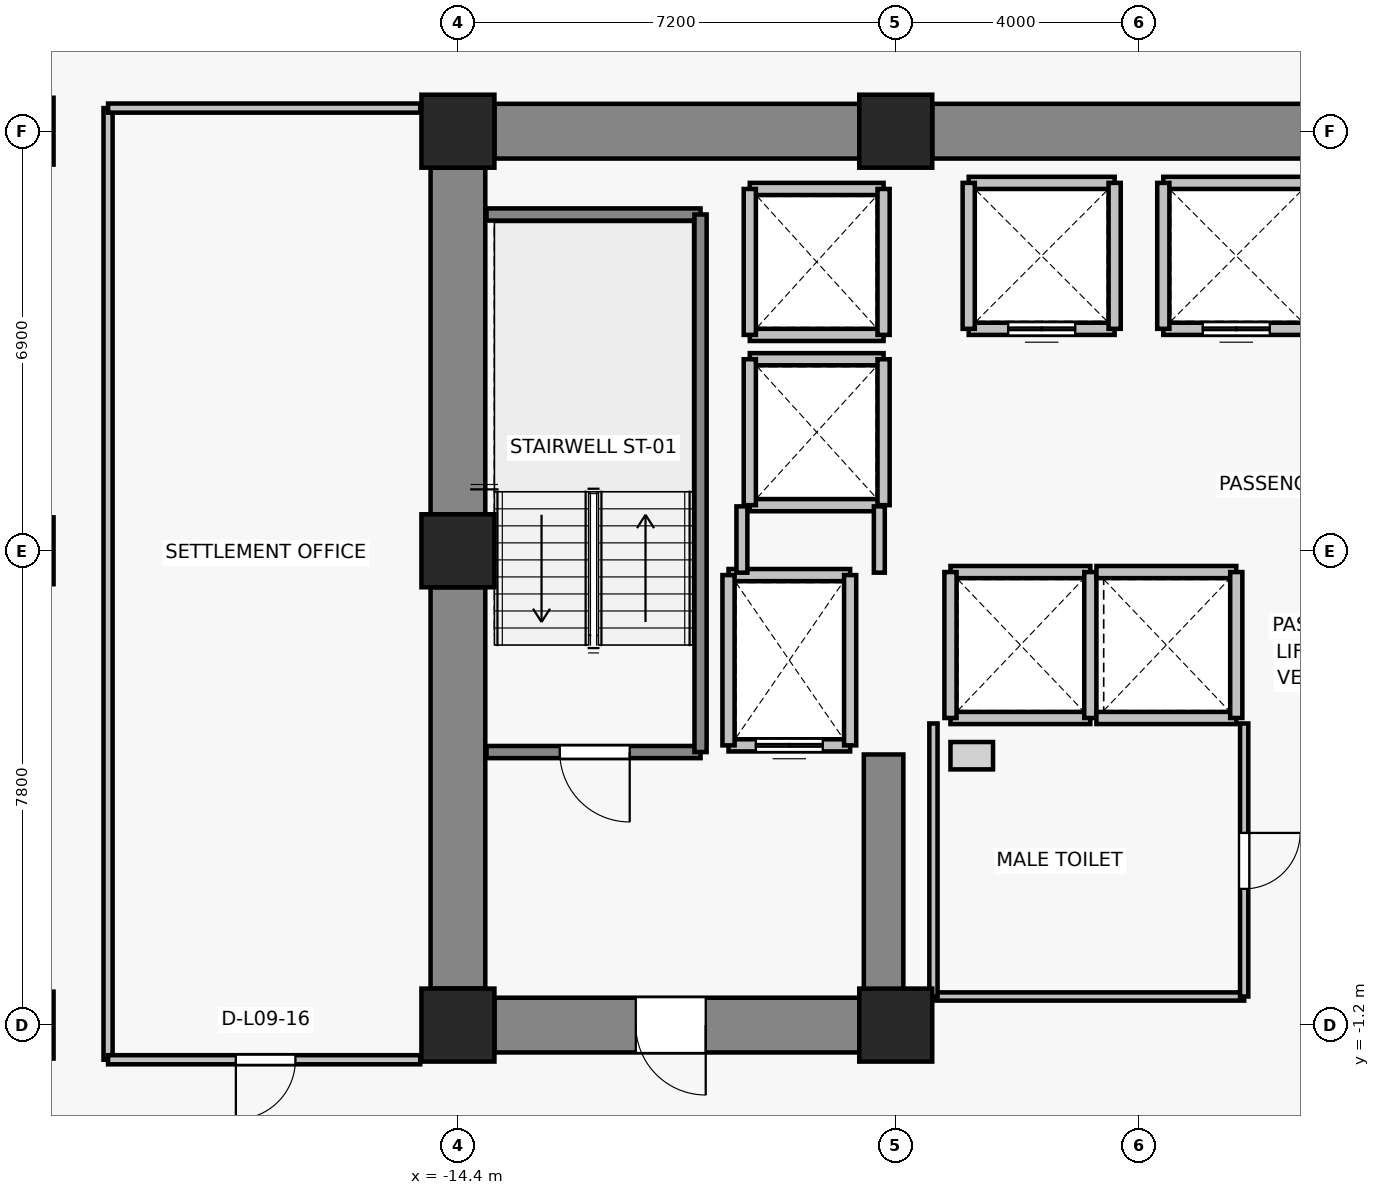
"""IFC4 building model, lengths in metres.
Left out: names, types, materials, properties, quantities, classifications, styles, units other than length and angle.
Written with IfcOpenShell. Run it as: python <this file> out.ifc"""

import sys

from ifc_helpers import new_model, si_unit, direction, frame, frame_2d, origin, origin_2d, place, context, subcontext, project, spatial, rectangle, extrude, source, transform, mapped, element, fill, save


model = new_model("IFC4")
c1 = context("Model", 3, precision=1e-05, world=origin(), true_north=direction((0.0, 1.0)))
c2 = subcontext(c1, "Body", "Model", "MODEL_VIEW")
j1 = project(units=[si_unit("LENGTHUNIT", "METRE"), si_unit("PLANEANGLEUNIT", "RADIAN")], contexts=[c1])
p1 = place(None, origin())
s1 = spatial("IfcSite", under=j1, at=p1, CompositionType="ELEMENT")
p2 = place(p1, origin())
s2 = spatial("IfcBuilding", under=s1, at=p2, CompositionType="ELEMENT")
p3 = place(p2, frame((0.0, 0.0, 37.3)))
s3 = spatial("IfcBuildingStorey", under=s2, at=p3, CompositionType="ELEMENT", Elevation=37.3)
for number, where, z_axis, x_axis in (
    (1, (-14.4, -1.2, 0.0), (0.0, 0.0, 1.0), (1.0, 0.0, 0.0)),
    (2, (-7.2, -1.2, 0.0), (0.0, 0.0, 1.0), (1.0, 0.0, 0.0)),
    (3, (-14.4, 6.6, 0.0), (0.0, 0.0, 1.0), (1.0, 0.0, 0.0)),
    (4, (-14.4, 13.5, 0.0), (0.0, 0.0, 1.0), (1.0, 0.0, 0.0)),
    (5, (-7.2, 13.5, 0.0), (0.0, 0.0, 1.0), (1.0, 0.0, 0.0)),
):
    element("IfcColumn", number, at=place(p3, frame(where, z_axis=z_axis, x_axis=x_axis)), inside=s3, PredefinedType="COLUMN", context=c2, shape_type="SweptSolid", body=[
        extrude(rectangle(XDim=1.2, YDim=1.2, at=origin_2d()), origin(), (0.0, 0.0, 1.0), 3.3),
    ])
for number, where, z_axis, x_axis in (
    (6, (-21.6, -1.2, 0.0), (0.0, 0.0, 1.0), (1.0, 0.0, 0.0)),
    (7, (-21.6, 6.6, 0.0), (0.0, 0.0, 1.0), (1.0, 0.0, 0.0)),
    (8, (-21.6, 13.5, 0.0), (0.0, 0.0, 1.0), (1.0, 0.0, 0.0)),
):
    element("IfcColumn", number, at=place(p3, frame(where, z_axis=z_axis, x_axis=x_axis)), inside=s3, PredefinedType="COLUMN", context=c2, shape_type="SweptSolid", body=[
        extrude(rectangle(XDim=1.1, YDim=1.1, at=origin_2d()), origin(), (0.0, 0.0, 1.0), 3.3),
    ])
p4 = place(p3, frame((-13.8, 13.5, 0.0), z_axis=(0.0, 0.0, 1.0), x_axis=(1.0, 0.0, 0.0)))
e9 = element("IfcWall", 9, at=p4, inside=s3, PredefinedType="SHEAR", context=c2, shape_type="SweptSolid", body=[
    extrude(rectangle(XDim=6.0, YDim=0.9, at=frame_2d((3.0, 0.0))), origin(), (0.0, 0.0, 1.0), 3.075),
])
p5 = place(p3, frame((-6.6, 13.5, 0.0), z_axis=(0.0, 0.0, 1.0), x_axis=(1.0, 0.0, 0.0)))
e10 = element("IfcWall", 10, at=p5, inside=s3, PredefinedType="SHEAR", context=c2, shape_type="SweptSolid", body=[
    extrude(rectangle(XDim=13.2, YDim=0.9, at=frame_2d((6.6, 0.0))), origin(), (0.0, 0.0, 1.0), 3.075),
])
p6 = place(p3, frame((-14.4, -0.6, 0.0), z_axis=(0.0, 0.0, 1.0), x_axis=(0.0, 1.0, 0.0)))
e11 = element("IfcWall", 11, at=p6, inside=s3, PredefinedType="SHEAR", context=c2, shape_type="SweptSolid", body=[
    extrude(rectangle(XDim=6.6, YDim=0.9, at=frame_2d((3.3, 0.0))), origin(), (0.0, 0.0, 1.0), 3.075),
])
p7 = place(p3, frame((-14.4, 7.2, 0.0), z_axis=(0.0, 0.0, 1.0), x_axis=(0.0, 1.0, 0.0)))
e12 = element("IfcWall", 12, at=p7, inside=s3, PredefinedType="SHEAR", context=c2, shape_type="SweptSolid", body=[
    extrude(rectangle(XDim=5.7, YDim=0.9, at=frame_2d((2.85, 0.0))), origin(), (0.0, 0.0, 1.0), 3.075),
])
p8 = place(p3, frame((-7.8, -1.2, 0.0), z_axis=(0.0, 0.0, 1.0), x_axis=(-1.0, 0.0, 0.0)))
e13 = element("IfcWall", 13, at=p8, inside=s3, PredefinedType="SHEAR", context=c2, shape_type="SweptSolid", body=[
    extrude(rectangle(XDim=6.0, YDim=0.9, at=frame_2d((3.0, 0.0))), origin(), (0.0, 0.0, 1.0), 3.075),
])
p9 = place(p8, frame((2.525, 0.0, 0.0)))
e14 = element("IfcOpeningElement", 14, at=p9, cuts=e13, PredefinedType="OPENING", context=c2, shape_type="SweptSolid", body=[
    extrude(rectangle(XDim=1.15, YDim=2.15, at=frame_2d((0.575, 1.075))), frame((0.0, 0.46, 0.0), z_axis=(0.0, -1.0, 0.0), x_axis=(1.0, 0.0, 0.0)), (0.0, 0.0, 1.0), 0.92),
])
p10 = place(p3, frame((-7.4, -0.75, 0.0), z_axis=(0.0, 0.0, 1.0), x_axis=(0.0, 1.0, 0.0)))
e15 = element("IfcWall", 15, at=p10, inside=s3, PredefinedType="SHEAR", context=c2, shape_type="SweptSolid", body=[
    extrude(rectangle(XDim=4.0, YDim=0.65, at=frame_2d((2.0, 0.0))), origin(), (0.0, 0.0, 1.0), 3.075),
])
p11 = place(p3, frame((-7.95, 3.4, 0.0), z_axis=(0.0, 0.0, 1.0), x_axis=(-1.0, 0.0, 0.0)))
e16 = element("IfcWall", 16, at=p11, inside=s3, PredefinedType="SOLIDWALL", context=c2, shape_type="SweptSolid", body=[
    extrude(rectangle(XDim=2.0, YDim=0.2, at=frame_2d((1.0, 0.0))), origin(), (0.0, 0.0, 1.0), 3.075),
])
p12 = place(p11, frame((0.45, 0.0, 0.0)))
e17 = element("IfcOpeningElement", 17, at=p12, cuts=e16, PredefinedType="OPENING", context=c2, shape_type="SweptSolid", body=[
    extrude(rectangle(XDim=1.1, YDim=2.2, at=frame_2d((0.55, 1.1))), frame((0.0, 0.11, 0.0), z_axis=(0.0, -1.0, 0.0), x_axis=(1.0, 0.0, 0.0)), (0.0, 0.0, 1.0), 0.22),
])
p13 = place(p3, frame((-9.95, 6.2, 0.0), z_axis=(0.0, 0.0, 1.0), x_axis=(1.0, 0.0, 0.0)))
e18 = element("IfcWall", 18, at=p13, inside=s3, PredefinedType="SOLIDWALL", context=c2, shape_type="SweptSolid", body=[
    extrude(rectangle(XDim=2.0, YDim=0.2, at=frame_2d((1.0, 0.0))), origin(), (0.0, 0.0, 1.0), 3.075),
])
for number, where, z_axis, x_axis in (
    (19, (-9.95, 3.4, 0.0), (0.0, 0.0, 1.0), (0.0, 1.0, 0.0)),
    (20, (-7.95, 6.2, 0.0), (0.0, 0.0, 1.0), (0.0, -1.0, 0.0)),
):
    element("IfcWall", number, at=place(p3, frame(where, z_axis=z_axis, x_axis=x_axis)), inside=s3, PredefinedType="SOLIDWALL", context=c2, shape_type="SweptSolid", body=[
        extrude(rectangle(XDim=2.8, YDim=0.2, at=frame_2d((1.4, 0.0))), origin(), (0.0, 0.0, 1.0), 3.075),
    ])
p14 = place(p3, frame((-3.6, 10.25, 0.0), z_axis=(0.0, 0.0, 1.0), x_axis=(-1.0, 0.0, 0.0)))
e21 = element("IfcWall", 21, at=p14, inside=s3, PredefinedType="SOLIDWALL", context=c2, shape_type="SweptSolid", body=[
    extrude(rectangle(XDim=2.4, YDim=0.2, at=frame_2d((1.2, 0.0))), origin(), (0.0, 0.0, 1.0), 3.075),
])
p15 = place(p14, frame((0.65, 0.0, 0.0)))
e22 = element("IfcOpeningElement", 22, at=p15, cuts=e21, PredefinedType="OPENING", context=c2, shape_type="SweptSolid", body=[
    extrude(rectangle(XDim=1.1, YDim=2.2, at=frame_2d((0.55, 1.1))), frame((0.0, 0.11, 0.0), z_axis=(0.0, -1.0, 0.0), x_axis=(1.0, 0.0, 0.0)), (0.0, 0.0, 1.0), 0.22),
])
for number, where, z_axis, x_axis in (
    (23, (-6.0, 12.65, 0.0), (0.0, 0.0, 1.0), (1.0, 0.0, 0.0)),
    (24, (-6.0, 10.25, 0.0), (0.0, 0.0, 1.0), (0.0, 1.0, 0.0)),
    (25, (-3.6, 12.65, 0.0), (0.0, 0.0, 1.0), (0.0, -1.0, 0.0)),
):
    element("IfcWall", number, at=place(p3, frame(where, z_axis=z_axis, x_axis=x_axis)), inside=s3, PredefinedType="SOLIDWALL", context=c2, shape_type="SweptSolid", body=[
        extrude(rectangle(XDim=2.4, YDim=0.2, at=frame_2d((1.2, 0.0))), origin(), (0.0, 0.0, 1.0), 3.075),
    ])
p16 = place(p3, frame((-0.4, 10.25, 0.0), z_axis=(0.0, 0.0, 1.0), x_axis=(-1.0, 0.0, 0.0)))
e26 = element("IfcWall", 26, at=p16, inside=s3, PredefinedType="SOLIDWALL", context=c2, shape_type="SweptSolid", body=[
    extrude(rectangle(XDim=2.4, YDim=0.2, at=frame_2d((1.2, 0.0))), origin(), (0.0, 0.0, 1.0), 3.075),
])
p17 = place(p16, frame((0.65, 0.0, 0.0)))
e27 = element("IfcOpeningElement", 27, at=p17, cuts=e26, PredefinedType="OPENING", context=c2, shape_type="SweptSolid", body=[
    extrude(rectangle(XDim=1.1, YDim=2.2, at=frame_2d((0.55, 1.1))), frame((0.0, 0.11, 0.0), z_axis=(0.0, -1.0, 0.0), x_axis=(1.0, 0.0, 0.0)), (0.0, 0.0, 1.0), 0.22),
])
p18 = place(p3, frame((-2.8, 12.65, 0.0), z_axis=(0.0, 0.0, 1.0), x_axis=(1.0, 0.0, 0.0)))
e28 = element("IfcWall", 28, at=p18, inside=s3, PredefinedType="SOLIDWALL", context=c2, shape_type="SweptSolid", body=[
    extrude(rectangle(XDim=2.4, YDim=0.2, at=frame_2d((1.2, 0.0))), origin(), (0.0, 0.0, 1.0), 3.075),
])
p19 = place(p3, frame((-2.8, 10.25, 0.0), z_axis=(0.0, 0.0, 1.0), x_axis=(0.0, 1.0, 0.0)))
e29 = element("IfcWall", 29, at=p19, inside=s3, PredefinedType="SOLIDWALL", context=c2, shape_type="SweptSolid", body=[
    extrude(rectangle(XDim=2.4, YDim=0.2, at=frame_2d((1.2, 0.0))), origin(), (0.0, 0.0, 1.0), 3.075),
])
for number, where, z_axis, x_axis in (
    (30, (-4.0, 3.85, 0.0), (0.0, 0.0, 1.0), (-1.0, 0.0, 0.0)),
    (31, (-6.3, 6.25, 0.0), (0.0, 0.0, 1.0), (1.0, 0.0, 0.0)),
):
    element("IfcWall", number, at=place(p3, frame(where, z_axis=z_axis, x_axis=x_axis)), inside=s3, PredefinedType="SOLIDWALL", context=c2, shape_type="SweptSolid", body=[
        extrude(rectangle(XDim=2.3, YDim=0.2, at=frame_2d((1.15, 0.0))), origin(), (0.0, 0.0, 1.0), 3.075),
    ])
for number, where, z_axis, x_axis in (
    (32, (-6.3, 3.85, 0.0), (0.0, 0.0, 1.0), (0.0, 1.0, 0.0)),
    (33, (-4.0, 6.25, 0.0), (0.0, 0.0, 1.0), (0.0, -1.0, 0.0)),
):
    element("IfcWall", number, at=place(p3, frame(where, z_axis=z_axis, x_axis=x_axis)), inside=s3, PredefinedType="SOLIDWALL", context=c2, shape_type="SweptSolid", body=[
        extrude(rectangle(XDim=2.4, YDim=0.2, at=frame_2d((1.2, 0.0))), origin(), (0.0, 0.0, 1.0), 3.075),
    ])
for number, where, z_axis, x_axis in (
    (34, (-1.6, 3.85, 0.0), (0.0, 0.0, 1.0), (-1.0, 0.0, 0.0)),
    (35, (-3.9, 6.25, 0.0), (0.0, 0.0, 1.0), (1.0, 0.0, 0.0)),
):
    element("IfcWall", number, at=place(p3, frame(where, z_axis=z_axis, x_axis=x_axis)), inside=s3, PredefinedType="SOLIDWALL", context=c2, shape_type="SweptSolid", body=[
        extrude(rectangle(XDim=2.3, YDim=0.2, at=frame_2d((1.15, 0.0))), origin(), (0.0, 0.0, 1.0), 3.075),
    ])
p20 = place(p3, frame((-1.6, 6.25, 0.0), z_axis=(0.0, 0.0, 1.0), x_axis=(0.0, -1.0, 0.0)))
e36 = element("IfcWall", 36, at=p20, inside=s3, PredefinedType="SOLIDWALL", context=c2, shape_type="SweptSolid", body=[
    extrude(rectangle(XDim=2.4, YDim=0.2, at=frame_2d((1.2, 0.0))), origin(), (0.0, 0.0, 1.0), 3.075),
])
for number, where, z_axis, x_axis in (
    (37, (-7.4, 7.35, 0.0), (0.0, 0.0, 1.0), (-1.0, 0.0, 0.0)),
    (38, (-9.6, 9.75, 0.0), (0.0, 0.0, 1.0), (1.0, 0.0, 0.0)),
):
    element("IfcWall", number, at=place(p3, frame(where, z_axis=z_axis, x_axis=x_axis)), inside=s3, PredefinedType="SOLIDWALL", context=c2, shape_type="SweptSolid", body=[
        extrude(rectangle(XDim=2.2, YDim=0.2, at=frame_2d((1.1, 0.0))), origin(), (0.0, 0.0, 1.0), 2.465),
    ])
p21 = place(p3, frame((-9.6, 7.35, 0.0), z_axis=(0.0, 0.0, 1.0), x_axis=(0.0, 1.0, 0.0)))
e39 = element("IfcWall", 39, at=p21, inside=s3, PredefinedType="SOLIDWALL", context=c2, shape_type="SweptSolid", body=[
    extrude(rectangle(XDim=2.4, YDim=0.2, at=frame_2d((1.2, 0.0))), origin(), (0.0, 0.0, 1.0), 3.075),
])
p22 = place(p3, frame((-7.4, 9.75, 0.0), z_axis=(0.0, 0.0, 1.0), x_axis=(0.0, -1.0, 0.0)))
e40 = element("IfcWall", 40, at=p22, inside=s3, PredefinedType="SOLIDWALL", context=c2, shape_type="SweptSolid", body=[
    extrude(rectangle(XDim=2.4, YDim=0.2, at=frame_2d((1.2, 0.0))), origin(), (0.0, 0.0, 1.0), 2.465),
])
for number, where, z_axis, x_axis in (
    (41, (-7.4, 10.15, 0.0), (0.0, 0.0, 1.0), (-1.0, 0.0, 0.0)),
    (42, (-9.6, 12.55, 0.0), (0.0, 0.0, 1.0), (1.0, 0.0, 0.0)),
):
    element("IfcWall", number, at=place(p3, frame(where, z_axis=z_axis, x_axis=x_axis)), inside=s3, PredefinedType="SOLIDWALL", context=c2, shape_type="SweptSolid", body=[
        extrude(rectangle(XDim=2.2, YDim=0.2, at=frame_2d((1.1, 0.0))), origin(), (0.0, 0.0, 1.0), 2.465),
    ])
p23 = place(p3, frame((-9.6, 10.15, 0.0), z_axis=(0.0, 0.0, 1.0), x_axis=(0.0, 1.0, 0.0)))
e43 = element("IfcWall", 43, at=p23, inside=s3, PredefinedType="SOLIDWALL", context=c2, shape_type="SweptSolid", body=[
    extrude(rectangle(XDim=2.4, YDim=0.2, at=frame_2d((1.2, 0.0))), origin(), (0.0, 0.0, 1.0), 3.075),
])
p24 = place(p3, frame((-7.4, 12.55, 0.0), z_axis=(0.0, 0.0, 1.0), x_axis=(0.0, -1.0, 0.0)))
e44 = element("IfcWall", 44, at=p24, inside=s3, PredefinedType="SOLIDWALL", context=c2, shape_type="SweptSolid", body=[
    extrude(rectangle(XDim=2.4, YDim=0.2, at=frame_2d((1.2, 0.0))), origin(), (0.0, 0.0, 1.0), 2.465),
])
p25 = place(p3, frame((-10.41, 3.29, 0.0), z_axis=(0.0, 0.0, 1.0), x_axis=(-1.0, 0.0, 0.0)))
e45 = element("IfcWall", 45, at=p25, inside=s3, PredefinedType="SOLIDWALL", context=c2, shape_type="SweptSolid", body=[
    extrude(rectangle(XDim=3.52, YDim=0.2, at=frame_2d((1.76, 0.0))), origin(), (0.0, 0.0, 1.0), 3.075),
])
p26 = place(p25, frame((1.165, 0.0, 0.0)))
e46 = element("IfcOpeningElement", 46, at=p26, cuts=e45, PredefinedType="OPENING", context=c2, shape_type="SweptSolid", body=[
    extrude(rectangle(XDim=1.15, YDim=2.15, at=frame_2d((0.575, 1.075))), frame((0.0, 0.11, 0.0), z_axis=(0.0, -1.0, 0.0), x_axis=(1.0, 0.0, 0.0)), (0.0, 0.0, 1.0), 0.22),
])
p27 = place(p3, frame((-13.93, 12.13, 0.0), z_axis=(0.0, 0.0, 1.0), x_axis=(1.0, 0.0, 0.0)))
e47 = element("IfcWall", 47, at=p27, inside=s3, PredefinedType="SOLIDWALL", context=c2, shape_type="SweptSolid", body=[
    extrude(rectangle(XDim=3.52, YDim=0.2, at=frame_2d((1.76, 0.0))), origin(), (0.0, 0.0, 1.0), 3.075),
])
p28 = place(p3, frame((-10.41, 12.13, 0.0), z_axis=(0.0, 0.0, 1.0), x_axis=(0.0, -1.0, 0.0)))
e48 = element("IfcWall", 48, at=p28, inside=s3, PredefinedType="SOLIDWALL", context=c2, shape_type="SweptSolid", body=[
    extrude(rectangle(XDim=8.84, YDim=0.2, at=frame_2d((4.42, 0.0))), origin(), (0.0, 0.0, 1.0), 3.075),
])
p29 = place(p3, frame((-9.73, 6.24, 0.0), z_axis=(0.0, 0.0, 1.0), x_axis=(0.0, 1.0, 0.0)))
e49 = element("IfcWall", 49, at=p29, inside=s3, PredefinedType="PARTITIONING", context=c2, shape_type="SweptSolid", body=[
    extrude(rectangle(XDim=1.09, YDim=0.18, at=frame_2d((0.545, 0.0))), origin(), (0.0, 0.0, 1.0), 3.075),
])
p30 = place(p3, frame((-7.47, 7.33, 0.0), z_axis=(0.0, 0.0, 1.0), x_axis=(0.0, -1.0, 0.0)))
e50 = element("IfcWall", 50, at=p30, inside=s3, PredefinedType="PARTITIONING", context=c2, shape_type="SweptSolid", body=[
    extrude(rectangle(XDim=1.09, YDim=0.18, at=frame_2d((0.545, 0.0))), origin(), (0.0, 0.0, 1.0), 2.465),
])
p31 = place(p3, frame((-1.47, -0.73, 0.0), z_axis=(0.0, 0.0, 1.0), x_axis=(-1.0, 0.0, 0.0)))
e51 = element("IfcWall", 51, at=p31, inside=s3, PredefinedType="PARTITIONING", context=c2, shape_type="SweptSolid", body=[
    extrude(rectangle(XDim=5.11, YDim=0.135, at=frame_2d((2.555, 0.0))), origin(), (0.0, 0.0, 1.0), 3.075),
])
p32 = place(p3, frame((-6.58, -0.73, 0.0), z_axis=(0.0, 0.0, 1.0), x_axis=(0.0, 1.0, 0.0)))
e52 = element("IfcWall", 52, at=p32, inside=s3, PredefinedType="PARTITIONING", context=c2, shape_type="SweptSolid", body=[
    extrude(rectangle(XDim=4.49, YDim=0.135, at=frame_2d((2.245, 0.0))), origin(), (0.0, 0.0, 1.0), 3.075),
])
p33 = place(p3, frame((-1.47, 3.76, 0.0), z_axis=(0.0, 0.0, 1.0), x_axis=(0.0, -1.0, 0.0)))
e53 = element("IfcWall", 53, at=p33, inside=s3, PredefinedType="PARTITIONING", context=c2, shape_type="SweptSolid", body=[
    extrude(rectangle(XDim=4.49, YDim=0.135, at=frame_2d((2.245, 0.0))), origin(), (0.0, 0.0, 1.0), 3.075),
])
p34 = place(p33, frame((1.8, 0.0, 0.0)))
e54 = element("IfcOpeningElement", 54, at=p34, cuts=e53, PredefinedType="OPENING", context=c2, shape_type="SweptSolid", body=[
    extrude(rectangle(XDim=0.92, YDim=2.1, at=frame_2d((0.46, 1.05))), frame((0.0, 0.077, 0.0), z_axis=(0.0, -1.0, 0.0), x_axis=(1.0, 0.0, 0.0)), (0.0, 0.0, 1.0), 0.155),
])
p35 = place(p3, frame((-20.154, 13.88, 0.0), z_axis=(0.0, 0.0, 1.0), x_axis=(0.0, -1.0, 0.0)))
e55 = element("IfcWall", 55, at=p35, inside=s3, PredefinedType="PARTITIONING", context=c2, shape_type="SweptSolid", body=[
    extrude(rectangle(XDim=15.65, YDim=0.15, at=frame_2d((7.825, 0.0))), origin(), (0.0, 0.0, 1.0), 2.465),
])
p36 = place(p3, frame((-15.02, -1.77, 0.0), z_axis=(0.0, 0.0, 1.0), x_axis=(-1.0, 0.0, 0.0)))
e56 = element("IfcWall", 56, at=p36, inside=s3, PredefinedType="PARTITIONING", context=c2, shape_type="SweptSolid", body=[
    extrude(rectangle(XDim=5.134, YDim=0.15, at=frame_2d((2.567, 0.0))), origin(), (0.0, 0.0, 1.0), 3.075),
])
p37 = place(p36, frame((2.052, 0.0, 0.0)))
e57 = element("IfcOpeningElement", 57, at=p37, cuts=e56, PredefinedType="OPENING", context=c2, shape_type="SweptSolid", body=[
    extrude(rectangle(XDim=0.98, YDim=2.15, at=frame_2d((0.49, 1.075))), frame((0.0, 0.085, 0.0), z_axis=(0.0, -1.0, 0.0), x_axis=(1.0, 0.0, 0.0)), (0.0, 0.0, 1.0), 0.17),
])
p38 = place(p3, frame((-20.154, 13.88, 0.0), z_axis=(0.0, 0.0, 1.0), x_axis=(1.0, 0.0, 0.0)))
e58 = element("IfcWall", 58, at=p38, inside=s3, PredefinedType="PARTITIONING", context=c2, shape_type="SweptSolid", body=[
    extrude(rectangle(XDim=5.134, YDim=0.15, at=frame_2d((2.567, 0.0))), origin(), (0.0, 0.0, 1.0), 3.075),
])
m1 = source(origin(), c2, "Body", "SweptSolid", [
    extrude(rectangle(XDim=1.1, YDim=2.2, at=frame_2d((0.55, 1.1))), frame((0.0, 0.025, 0.0), z_axis=(0.0, -1.0, 0.0), x_axis=(1.0, 0.0, 0.0)), (0.0, 0.0, 1.0), 0.05),
])
p39 = place(p12, origin())
e59 = element("IfcDoor", 59, at=p39, inside=s3, OperationType="DOUBLE_DOOR_SLIDING", PredefinedType="DOOR", context=c2, shape_type="MappedRepresentation", body=[
    mapped(m1, transform((0.0, 0.0, 0.0), x_axis=(1.0, 0.0, 0.0), y_axis=(0.0, 1.0, 0.0), z_axis=(0.0, 0.0, 1.0), scale=1.0)),
])
fill(e17, e59)
p40 = place(p15, origin())
e60 = element("IfcDoor", 60, at=p40, inside=s3, OperationType="DOUBLE_DOOR_SLIDING", PredefinedType="DOOR", context=c2, shape_type="MappedRepresentation", body=[
    mapped(m1, transform((0.0, 0.0, 0.0), x_axis=(1.0, 0.0, 0.0), y_axis=(0.0, 1.0, 0.0), z_axis=(0.0, 0.0, 1.0), scale=1.0)),
])
fill(e22, e60)
p41 = place(p17, origin())
e61 = element("IfcDoor", 61, at=p41, inside=s3, OperationType="DOUBLE_DOOR_SLIDING", PredefinedType="DOOR", context=c2, shape_type="MappedRepresentation", body=[
    mapped(m1, transform((0.0, 0.0, 0.0), x_axis=(1.0, 0.0, 0.0), y_axis=(0.0, 1.0, 0.0), z_axis=(0.0, 0.0, 1.0), scale=1.0)),
])
fill(e27, e61)
m2 = source(origin(), c2, "Body", "SweptSolid", [
    extrude(rectangle(XDim=1.15, YDim=2.15, at=frame_2d((0.575, 1.075))), frame((0.0, 0.025, 0.0), z_axis=(0.0, -1.0, 0.0), x_axis=(1.0, 0.0, 0.0)), (0.0, 0.0, 1.0), 0.05),
])
p42 = place(p26, origin())
e62 = element("IfcDoor", 62, at=p42, inside=s3, OperationType="SINGLE_SWING_LEFT", PredefinedType="DOOR", context=c2, shape_type="MappedRepresentation", body=[
    mapped(m2, transform((0.0, 0.0, 0.0), x_axis=(1.0, 0.0, 0.0), y_axis=(0.0, 1.0, 0.0), z_axis=(0.0, 0.0, 1.0), scale=1.0)),
])
fill(e46, e62)
p43 = place(p9, origin())
e63 = element("IfcDoor", 63, at=p43, inside=s3, OperationType="SINGLE_SWING_LEFT", PredefinedType="DOOR", context=c2, shape_type="MappedRepresentation", body=[
    mapped(m2, transform((0.0, 0.0, 0.0), x_axis=(1.0, 0.0, 0.0), y_axis=(0.0, 1.0, 0.0), z_axis=(0.0, 0.0, 1.0), scale=1.0)),
])
fill(e14, e63)
m3 = source(origin(), c2, "Body", "SweptSolid", [
    extrude(rectangle(XDim=0.92, YDim=2.1, at=frame_2d((0.46, 1.05))), frame((0.0, 0.025, 0.0), z_axis=(0.0, -1.0, 0.0), x_axis=(1.0, 0.0, 0.0)), (0.0, 0.0, 1.0), 0.05),
])
p44 = place(p34, origin())
e64 = element("IfcDoor", 64, at=p44, inside=s3, OperationType="SINGLE_SWING_LEFT", PredefinedType="DOOR", context=c2, shape_type="MappedRepresentation", body=[
    mapped(m3, transform((0.0, 0.0, 0.0), x_axis=(1.0, 0.0, 0.0), y_axis=(0.0, 1.0, 0.0), z_axis=(0.0, 0.0, 1.0), scale=1.0)),
])
fill(e54, e64)
m4 = source(origin(), c2, "Body", "SweptSolid", [
    extrude(rectangle(XDim=0.98, YDim=2.15, at=frame_2d((0.49, 1.075))), frame((0.0, 0.025, 0.0), z_axis=(0.0, -1.0, 0.0), x_axis=(1.0, 0.0, 0.0)), (0.0, 0.0, 1.0), 0.05),
])
p45 = place(p37, origin())
e65 = element("IfcDoor", 65, at=p45, inside=s3, OperationType="SINGLE_SWING_RIGHT", PredefinedType="DOOR", context=c2, shape_type="MappedRepresentation", body=[
    mapped(m4, transform((0.0, 0.0, 0.0), x_axis=(1.0, 0.0, 0.0), y_axis=(0.0, 1.0, 0.0), z_axis=(0.0, 0.0, 1.0), scale=1.0)),
])
fill(e57, e65)
save(model, sys.argv[1])
